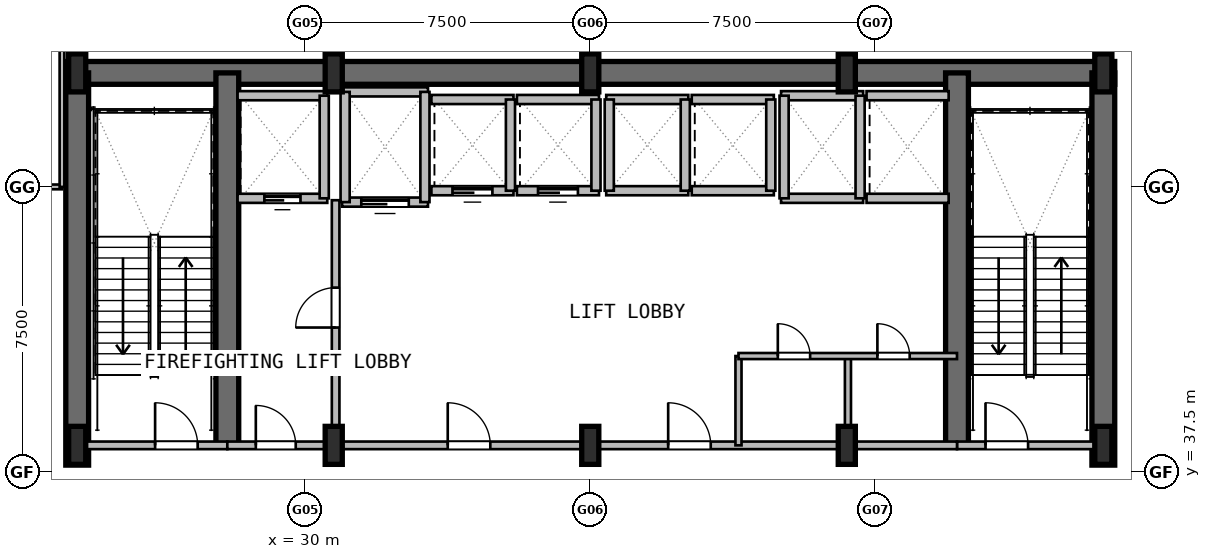
"""IFC4 building model, lengths in metres.
Left out: names, types, materials, properties, quantities, classifications, styles, units other than length and angle.
Written with IfcOpenShell. Run it as: python <this file> out.ifc"""

import sys

from ifc_helpers import new_model, si_unit, direction, frame, frame_2d, origin, origin_2d, place, context, subcontext, project, spatial, rectangle, i_section, extrude, element, fill, save


model = new_model("IFC4")
c1 = context("Model", 3, precision=1e-05, world=origin(), true_north=direction((0.0, 1.0)))
c2 = subcontext(c1, "Body", "Model", "MODEL_VIEW")
j1 = project(units=[si_unit("LENGTHUNIT", "METRE"), si_unit("PLANEANGLEUNIT", "RADIAN")], contexts=[c1])
p1 = place(None, origin())
s1 = spatial("IfcSite", under=j1, at=p1, CompositionType="ELEMENT")
p2 = place(p1, origin())
s2 = spatial("IfcBuilding", under=s1, at=p2, CompositionType="ELEMENT")
p3 = place(p2, frame((0.0, 0.0, 6.0)))
s3 = spatial("IfcBuildingStorey", under=s2, at=p3, CompositionType="ELEMENT", Elevation=6.0)
p4 = place(p3, frame((23.7, 48.0, 0.0), z_axis=(0.0, 0.0, 1.0), x_axis=(1.0, 0.0, 0.0)))
e1 = element("IfcWall", 1, at=p4, inside=s3, PredefinedType="SHEAR", context=c2, shape_type="SweptSolid", body=[
    extrude(rectangle(XDim=27.6, YDim=0.6, at=frame_2d((13.8, 0.0))), origin(), (0.0, 0.0, 1.0), 4.8),
])
for number, where, z_axis, x_axis in (
    (2, (24.0, 37.68, 0.0), (0.0, 0.0, 1.0), (0.0, 1.0, 0.0)),
    (3, (51.0, 37.68, 0.0), (0.0, 0.0, 1.0), (0.0, 1.0, 0.0)),
):
    element("IfcWall", number, at=place(p3, frame(where, z_axis=z_axis, x_axis=x_axis)), inside=s3, PredefinedType="SHEAR", context=c2, shape_type="SweptSolid", body=[
        extrude(rectangle(XDim=10.32, YDim=0.6, at=frame_2d((5.16, 0.0))), origin(), (0.0, 0.0, 1.0), 4.8),
    ])
for number, where, z_axis, x_axis in (
    (4, (27.95, 38.2, 0.0), (0.0, 0.0, 1.0), (0.0, 1.0, 0.0)),
    (5, (47.15, 38.2, 0.0), (0.0, 0.0, 1.0), (0.0, 1.0, 0.0)),
):
    element("IfcWall", number, at=place(p3, frame(where, z_axis=z_axis, x_axis=x_axis)), inside=s3, PredefinedType="SHEAR", context=c2, shape_type="SweptSolid", body=[
        extrude(rectangle(XDim=9.8, YDim=0.6, at=frame_2d((4.9, 0.0))), origin(), (0.0, 0.0, 1.0), 4.8),
    ])
for number, where, z_axis, x_axis in (
    (6, (24.0, 38.2, 0.0), (0.0, 0.0, 1.0), (1.0, 0.0, 0.0)),
    (7, (24.0, 48.0, 0.0), (0.0, 0.0, 1.0), (1.0, 0.0, 0.0)),
    (8, (30.75, 38.2, 0.0), (0.0, 0.0, 1.0), (1.0, 0.0, 0.0)),
    (9, (30.75, 48.0, 0.0), (0.0, 0.0, 1.0), (1.0, 0.0, 0.0)),
    (10, (37.5, 38.2, 0.0), (0.0, 0.0, 1.0), (1.0, 0.0, 0.0)),
    (11, (37.5, 48.0, 0.0), (0.0, 0.0, 1.0), (1.0, 0.0, 0.0)),
    (12, (44.25, 38.2, 0.0), (0.0, 0.0, 1.0), (1.0, 0.0, 0.0)),
    (13, (44.25, 48.0, 0.0), (0.0, 0.0, 1.0), (1.0, 0.0, 0.0)),
    (14, (51.0, 38.2, 0.0), (0.0, 0.0, 1.0), (1.0, 0.0, 0.0)),
    (15, (51.0, 48.0, 0.0), (0.0, 0.0, 1.0), (1.0, 0.0, 0.0)),
):
    element("IfcColumn", number, at=place(p3, frame(where, z_axis=z_axis, x_axis=x_axis)), inside=s3, PredefinedType="COLUMN", context=c2, shape_type="SweptSolid", body=[
        extrude(i_section(OverallWidth=0.45, OverallDepth=1.0, WebThickness=0.022, FlangeThickness=0.04, at=origin_2d()), origin(), (0.0, 0.0, 1.0), 4.8),
    ])
p5 = place(p3, frame((24.0, 38.2, 0.0), z_axis=(0.0, 0.0, 1.0), x_axis=(1.0, 0.0, 0.0)))
e16 = element("IfcWall", 16, at=p5, inside=s3, PredefinedType="PARTITIONING", context=c2, shape_type="SweptSolid", body=[
    extrude(rectangle(XDim=3.95, YDim=0.2, at=frame_2d((1.975, 0.0))), origin(), (0.0, 0.0, 1.0), 3.68),
])
p6 = place(p5, frame((2.05, 0.0, 0.0)))
e17 = element("IfcOpeningElement", 17, at=p6, cuts=e16, PredefinedType="OPENING", context=c2, shape_type="SweptSolid", body=[
    extrude(rectangle(XDim=1.12, YDim=2.1, at=frame_2d((0.56, 1.05))), frame((0.0, 0.11, 0.0), z_axis=(0.0, -1.0, 0.0), x_axis=(1.0, 0.0, 0.0)), (0.0, 0.0, 1.0), 0.22),
])
p7 = place(p3, frame((47.15, 38.2, 0.0), z_axis=(0.0, 0.0, 1.0), x_axis=(1.0, 0.0, 0.0)))
e18 = element("IfcWall", 18, at=p7, inside=s3, PredefinedType="PARTITIONING", context=c2, shape_type="SweptSolid", body=[
    extrude(rectangle(XDim=3.85, YDim=0.2, at=frame_2d((1.925, 0.0))), origin(), (0.0, 0.0, 1.0), 3.68),
])
p8 = place(p7, frame((0.75, 0.0, 0.0)))
e19 = element("IfcOpeningElement", 19, at=p8, cuts=e18, PredefinedType="OPENING", context=c2, shape_type="SweptSolid", body=[
    extrude(rectangle(XDim=1.12, YDim=2.1, at=frame_2d((0.56, 1.05))), frame((0.0, 0.11, 0.0), z_axis=(0.0, -1.0, 0.0), x_axis=(1.0, 0.0, 0.0)), (0.0, 0.0, 1.0), 0.22),
])
p9 = place(p3, frame((30.8, 38.2, 0.0), z_axis=(0.0, 0.0, 1.0), x_axis=(0.0, 1.0, 0.0)))
e20 = element("IfcWall", 20, at=p9, inside=s3, PredefinedType="PARTITIONING", context=c2, shape_type="SweptSolid", body=[
    extrude(rectangle(XDim=6.45, YDim=0.2, at=frame_2d((3.225, 0.0))), origin(), (0.0, 0.0, 1.0), 3.68),
])
p10 = place(p9, frame((3.1, 0.0, 0.0)))
e21 = element("IfcOpeningElement", 21, at=p10, cuts=e20, PredefinedType="OPENING", context=c2, shape_type="SweptSolid", body=[
    extrude(rectangle(XDim=1.05, YDim=2.1, at=frame_2d((0.525, 1.05))), frame((0.0, 0.11, 0.0), z_axis=(0.0, -1.0, 0.0), x_axis=(1.0, 0.0, 0.0)), (0.0, 0.0, 1.0), 0.22),
])
p11 = place(p3, frame((27.95, 38.2, 0.0), z_axis=(0.0, 0.0, 1.0), x_axis=(1.0, 0.0, 0.0)))
e22 = element("IfcWall", 22, at=p11, inside=s3, PredefinedType="PARTITIONING", context=c2, shape_type="SweptSolid", body=[
    extrude(rectangle(XDim=2.85, YDim=0.2, at=frame_2d((1.425, 0.0))), origin(), (0.0, 0.0, 1.0), 3.68),
])
p12 = place(p11, frame((0.75, 0.0, 0.0)))
e23 = element("IfcOpeningElement", 23, at=p12, cuts=e22, PredefinedType="OPENING", context=c2, shape_type="SweptSolid", body=[
    extrude(rectangle(XDim=1.05, YDim=2.1, at=frame_2d((0.525, 1.05))), frame((0.0, 0.11, 0.0), z_axis=(0.0, -1.0, 0.0), x_axis=(1.0, 0.0, 0.0)), (0.0, 0.0, 1.0), 0.22),
])
p13 = place(p3, frame((30.8, 38.2, 0.0), z_axis=(0.0, 0.0, 1.0), x_axis=(1.0, 0.0, 0.0)))
e24 = element("IfcWall", 24, at=p13, inside=s3, PredefinedType="PARTITIONING", context=c2, shape_type="SweptSolid", body=[
    extrude(rectangle(XDim=16.35, YDim=0.2, at=frame_2d((8.175, 0.0))), origin(), (0.0, 0.0, 1.0), 3.68),
])
p14 = place(p13, frame((2.95, 0.0, 0.0)))
e25 = element("IfcOpeningElement", 25, at=p14, cuts=e24, PredefinedType="OPENING", context=c2, shape_type="SweptSolid", body=[
    extrude(rectangle(XDim=1.12, YDim=2.1, at=frame_2d((0.56, 1.05))), frame((0.0, 0.11, 0.0), z_axis=(0.0, -1.0, 0.0), x_axis=(1.0, 0.0, 0.0)), (0.0, 0.0, 1.0), 0.22),
])
p15 = place(p13, frame((8.75, 0.0, 0.0)))
e26 = element("IfcOpeningElement", 26, at=p15, cuts=e24, PredefinedType="OPENING", context=c2, shape_type="SweptSolid", body=[
    extrude(rectangle(XDim=1.12, YDim=2.1, at=frame_2d((0.56, 1.05))), frame((0.0, 0.11, 0.0), z_axis=(0.0, -1.0, 0.0), x_axis=(1.0, 0.0, 0.0)), (0.0, 0.0, 1.0), 0.22),
])
p16 = place(p3, frame((28.22, 44.7, 0.0), z_axis=(0.0, 0.0, 1.0), x_axis=(1.0, 0.0, 0.0)))
e27 = element("IfcWall", 27, at=p16, inside=s3, PredefinedType="PARTITIONING", context=c2, shape_type="SweptSolid", body=[
    extrude(rectangle(XDim=2.36, YDim=0.24, at=frame_2d((1.18, 0.0))), origin(), (0.0, 0.0, 1.0), 4.48),
])
p17 = place(p16, frame((0.705, 0.0, 0.0)))
e28 = element("IfcOpeningElement", 28, at=p17, cuts=e27, PredefinedType="OPENING", context=c2, shape_type="SweptSolid", body=[
    extrude(rectangle(XDim=0.95, YDim=2.15, at=frame_2d((0.475, 1.075))), frame((0.0, 0.13, 0.0), z_axis=(0.0, -1.0, 0.0), x_axis=(1.0, 0.0, 0.0)), (0.0, 0.0, 1.0), 0.26),
])
p18 = place(p3, frame((28.22, 47.4, 0.0), z_axis=(0.0, 0.0, 1.0), x_axis=(1.0, 0.0, 0.0)))
e29 = element("IfcWall", 29, at=p18, inside=s3, PredefinedType="PARTITIONING", context=c2, shape_type="SweptSolid", body=[
    extrude(rectangle(XDim=2.36, YDim=0.24, at=frame_2d((1.18, 0.0))), origin(), (0.0, 0.0, 1.0), 4.48),
])
p19 = place(p3, frame((30.5, 44.7, 0.0), z_axis=(0.0, 0.0, 1.0), x_axis=(0.0, 1.0, 0.0)))
e30 = element("IfcWall", 30, at=p19, inside=s3, PredefinedType="PARTITIONING", context=c2, shape_type="SweptSolid", body=[
    extrude(rectangle(XDim=2.7, YDim=0.24, at=frame_2d((1.35, 0.0))), origin(), (0.0, 0.0, 1.0), 3.68),
])
p20 = place(p3, frame((30.97, 44.6, 0.0), z_axis=(0.0, 0.0, 1.0), x_axis=(1.0, 0.0, 0.0)))
e31 = element("IfcWall", 31, at=p20, inside=s3, PredefinedType="PARTITIONING", context=c2, shape_type="SweptSolid", body=[
    extrude(rectangle(XDim=2.26, YDim=0.24, at=frame_2d((1.13, 0.0))), origin(), (0.0, 0.0, 1.0), 4.48),
])
p21 = place(p20, frame((0.505, 0.0, 0.0)))
e32 = element("IfcOpeningElement", 32, at=p21, cuts=e31, PredefinedType="OPENING", context=c2, shape_type="SweptSolid", body=[
    extrude(rectangle(XDim=1.25, YDim=2.2, at=frame_2d((0.625, 1.1))), frame((0.0, 0.13, 0.0), z_axis=(0.0, -1.0, 0.0), x_axis=(1.0, 0.0, 0.0)), (0.0, 0.0, 1.0), 0.26),
])
p22 = place(p3, frame((30.97, 47.5, 0.0), z_axis=(0.0, 0.0, 1.0), x_axis=(1.0, 0.0, 0.0)))
e33 = element("IfcWall", 33, at=p22, inside=s3, PredefinedType="PARTITIONING", context=c2, shape_type="SweptSolid", body=[
    extrude(rectangle(XDim=2.26, YDim=0.24, at=frame_2d((1.13, 0.0))), origin(), (0.0, 0.0, 1.0), 4.48),
])
p23 = place(p3, frame((31.05, 44.6, 0.0), z_axis=(0.0, 0.0, 1.0), x_axis=(0.0, 1.0, 0.0)))
e34 = element("IfcWall", 34, at=p23, inside=s3, PredefinedType="PARTITIONING", context=c2, shape_type="SweptSolid", body=[
    extrude(rectangle(XDim=2.9, YDim=0.24, at=frame_2d((1.45, 0.0))), origin(), (0.0, 0.0, 1.0), 3.68),
])
p24 = place(p3, frame((33.15, 44.6, 0.0), z_axis=(0.0, 0.0, 1.0), x_axis=(0.0, 1.0, 0.0)))
e35 = element("IfcWall", 35, at=p24, inside=s3, PredefinedType="PARTITIONING", context=c2, shape_type="SweptSolid", body=[
    extrude(rectangle(XDim=2.9, YDim=0.24, at=frame_2d((1.45, 0.0))), origin(), (0.0, 0.0, 1.0), 4.48),
])
p25 = place(p3, frame((33.32, 44.9, 0.0), z_axis=(0.0, 0.0, 1.0), x_axis=(1.0, 0.0, 0.0)))
e36 = element("IfcWall", 36, at=p25, inside=s3, PredefinedType="PARTITIONING", context=c2, shape_type="SweptSolid", body=[
    extrude(rectangle(XDim=2.16, YDim=0.24, at=frame_2d((1.08, 0.0))), origin(), (0.0, 0.0, 1.0), 4.48),
])
p26 = place(p25, frame((0.555, 0.0, 0.0)))
e37 = element("IfcOpeningElement", 37, at=p26, cuts=e36, PredefinedType="OPENING", context=c2, shape_type="SweptSolid", body=[
    extrude(rectangle(XDim=1.05, YDim=2.15, at=frame_2d((0.525, 1.075))), frame((0.0, 0.13, 0.0), z_axis=(0.0, -1.0, 0.0), x_axis=(1.0, 0.0, 0.0)), (0.0, 0.0, 1.0), 0.26),
])
p27 = place(p3, frame((33.32, 47.3, 0.0), z_axis=(0.0, 0.0, 1.0), x_axis=(1.0, 0.0, 0.0)))
e38 = element("IfcWall", 38, at=p27, inside=s3, PredefinedType="PARTITIONING", context=c2, shape_type="SweptSolid", body=[
    extrude(rectangle(XDim=2.16, YDim=0.24, at=frame_2d((1.08, 0.0))), origin(), (0.0, 0.0, 1.0), 4.48),
])
p28 = place(p3, frame((35.4, 44.9, 0.0), z_axis=(0.0, 0.0, 1.0), x_axis=(0.0, 1.0, 0.0)))
e39 = element("IfcWall", 39, at=p28, inside=s3, PredefinedType="PARTITIONING", context=c2, shape_type="SweptSolid", body=[
    extrude(rectangle(XDim=2.4, YDim=0.24, at=frame_2d((1.2, 0.0))), origin(), (0.0, 0.0, 1.0), 4.48),
])
p29 = place(p3, frame((35.57, 44.9, 0.0), z_axis=(0.0, 0.0, 1.0), x_axis=(1.0, 0.0, 0.0)))
e40 = element("IfcWall", 40, at=p29, inside=s3, PredefinedType="PARTITIONING", context=c2, shape_type="SweptSolid", body=[
    extrude(rectangle(XDim=2.16, YDim=0.24, at=frame_2d((1.08, 0.0))), origin(), (0.0, 0.0, 1.0), 4.48),
])
p30 = place(p29, frame((0.555, 0.0, 0.0)))
e41 = element("IfcOpeningElement", 41, at=p30, cuts=e40, PredefinedType="OPENING", context=c2, shape_type="SweptSolid", body=[
    extrude(rectangle(XDim=1.05, YDim=2.15, at=frame_2d((0.525, 1.075))), frame((0.0, 0.13, 0.0), z_axis=(0.0, -1.0, 0.0), x_axis=(1.0, 0.0, 0.0)), (0.0, 0.0, 1.0), 0.26),
])
p31 = place(p3, frame((35.57, 47.3, 0.0), z_axis=(0.0, 0.0, 1.0), x_axis=(1.0, 0.0, 0.0)))
e42 = element("IfcWall", 42, at=p31, inside=s3, PredefinedType="PARTITIONING", context=c2, shape_type="SweptSolid", body=[
    extrude(rectangle(XDim=2.16, YDim=0.24, at=frame_2d((1.08, 0.0))), origin(), (0.0, 0.0, 1.0), 4.48),
])
p32 = place(p3, frame((37.65, 44.9, 0.0), z_axis=(0.0, 0.0, 1.0), x_axis=(0.0, 1.0, 0.0)))
e43 = element("IfcWall", 43, at=p32, inside=s3, PredefinedType="PARTITIONING", context=c2, shape_type="SweptSolid", body=[
    extrude(rectangle(XDim=2.4, YDim=0.24, at=frame_2d((1.2, 0.0))), origin(), (0.0, 0.0, 1.0), 4.48),
])
for number, where, z_axis, x_axis in (
    (44, (37.92, 44.9, 0.0), (0.0, 0.0, 1.0), (1.0, 0.0, 0.0)),
    (45, (37.92, 47.3, 0.0), (0.0, 0.0, 1.0), (1.0, 0.0, 0.0)),
):
    element("IfcWall", number, at=place(p3, frame(where, z_axis=z_axis, x_axis=x_axis)), inside=s3, PredefinedType="PARTITIONING", context=c2, shape_type="SweptSolid", body=[
        extrude(rectangle(XDim=2.16, YDim=0.24, at=frame_2d((1.08, 0.0))), origin(), (0.0, 0.0, 1.0), 4.48),
    ])
for number, where, z_axis, x_axis in (
    (46, (38.0, 44.9, 0.0), (0.0, 0.0, 1.0), (0.0, 1.0, 0.0)),
    (47, (40.0, 44.9, 0.0), (0.0, 0.0, 1.0), (0.0, 1.0, 0.0)),
):
    element("IfcWall", number, at=place(p3, frame(where, z_axis=z_axis, x_axis=x_axis)), inside=s3, PredefinedType="PARTITIONING", context=c2, shape_type="SweptSolid", body=[
        extrude(rectangle(XDim=2.4, YDim=0.24, at=frame_2d((1.2, 0.0))), origin(), (0.0, 0.0, 1.0), 4.48),
    ])
for number, where, z_axis, x_axis in (
    (48, (40.17, 44.9, 0.0), (0.0, 0.0, 1.0), (1.0, 0.0, 0.0)),
    (49, (40.17, 47.3, 0.0), (0.0, 0.0, 1.0), (1.0, 0.0, 0.0)),
):
    element("IfcWall", number, at=place(p3, frame(where, z_axis=z_axis, x_axis=x_axis)), inside=s3, PredefinedType="PARTITIONING", context=c2, shape_type="SweptSolid", body=[
        extrude(rectangle(XDim=2.16, YDim=0.24, at=frame_2d((1.08, 0.0))), origin(), (0.0, 0.0, 1.0), 4.48),
    ])
p33 = place(p3, frame((42.25, 44.9, 0.0), z_axis=(0.0, 0.0, 1.0), x_axis=(0.0, 1.0, 0.0)))
e50 = element("IfcWall", 50, at=p33, inside=s3, PredefinedType="PARTITIONING", context=c2, shape_type="SweptSolid", body=[
    extrude(rectangle(XDim=2.4, YDim=0.24, at=frame_2d((1.2, 0.0))), origin(), (0.0, 0.0, 1.0), 4.48),
])
for number, where, z_axis, x_axis in (
    (51, (42.52, 44.7, 0.0), (0.0, 0.0, 1.0), (1.0, 0.0, 0.0)),
    (52, (42.52, 47.4, 0.0), (0.0, 0.0, 1.0), (1.0, 0.0, 0.0)),
):
    element("IfcWall", number, at=place(p3, frame(where, z_axis=z_axis, x_axis=x_axis)), inside=s3, PredefinedType="PARTITIONING", context=c2, shape_type="SweptSolid", body=[
        extrude(rectangle(XDim=2.16, YDim=0.24, at=frame_2d((1.08, 0.0))), origin(), (0.0, 0.0, 1.0), 4.48),
    ])
for number, where, z_axis, x_axis in (
    (53, (42.6, 44.7, 0.0), (0.0, 0.0, 1.0), (0.0, 1.0, 0.0)),
    (54, (44.6, 44.7, 0.0), (0.0, 0.0, 1.0), (0.0, 1.0, 0.0)),
):
    element("IfcWall", number, at=place(p3, frame(where, z_axis=z_axis, x_axis=x_axis)), inside=s3, PredefinedType="PARTITIONING", context=c2, shape_type="SweptSolid", body=[
        extrude(rectangle(XDim=2.7, YDim=0.24, at=frame_2d((1.35, 0.0))), origin(), (0.0, 0.0, 1.0), 4.48),
    ])
for number, where, z_axis, x_axis in (
    (55, (44.77, 44.7, 0.0), (0.0, 0.0, 1.0), (1.0, 0.0, 0.0)),
    (56, (44.77, 47.4, 0.0), (0.0, 0.0, 1.0), (1.0, 0.0, 0.0)),
):
    element("IfcWall", number, at=place(p3, frame(where, z_axis=z_axis, x_axis=x_axis)), inside=s3, PredefinedType="PARTITIONING", context=c2, shape_type="SweptSolid", body=[
        extrude(rectangle(XDim=2.16, YDim=0.24, at=frame_2d((1.08, 0.0))), origin(), (0.0, 0.0, 1.0), 4.48),
    ])
p34 = place(p3, frame((19.0, 45.0, 0.0), z_axis=(0.0, 0.0, 1.0), x_axis=(1.0, 0.0, 0.0)))
e57 = element("IfcWall", 57, at=p34, inside=s3, PredefinedType="PARTITIONING", context=c2, shape_type="SweptSolid", body=[
    extrude(rectangle(XDim=4.6, YDim=0.125, at=frame_2d((2.3, 0.0))), origin(), (0.0, 0.0, 1.0), 4.48),
])
p35 = place(p34, frame((1.5, 0.0, 0.0)))
e58 = element("IfcOpeningElement", 58, at=p35, cuts=e57, PredefinedType="OPENING", context=c2, shape_type="SweptSolid", body=[
    extrude(rectangle(XDim=0.9, YDim=2.05, at=frame_2d((0.45, 1.025))), frame((0.0, 0.073, 0.0), z_axis=(0.0, -1.0, 0.0), x_axis=(1.0, 0.0, 0.0)), (0.0, 0.0, 1.0), 0.145),
])
p36 = place(p3, frame((23.6, 45.0, 0.0), z_axis=(0.0, 0.0, 1.0), x_axis=(0.0, 1.0, 0.0)))
e59 = element("IfcWall", 59, at=p36, inside=s3, PredefinedType="PARTITIONING", context=c2, shape_type="SweptSolid", body=[
    extrude(rectangle(XDim=4.6, YDim=0.125, at=frame_2d((2.3, 0.0))), origin(), (0.0, 0.0, 1.0), 4.48),
])
for number, where, z_axis, x_axis in (
    (60, (41.4, 38.2, 0.0), (0.0, 0.0, 1.0), (0.0, 1.0, 0.0)),
    (61, (44.28, 38.2, 0.0), (0.0, 0.0, 1.0), (0.0, 1.0, 0.0)),
):
    element("IfcWall", number, at=place(p3, frame(where, z_axis=z_axis, x_axis=x_axis)), inside=s3, PredefinedType="PARTITIONING", context=c2, shape_type="SweptSolid", body=[
        extrude(rectangle(XDim=2.35, YDim=0.16, at=frame_2d((1.175, 0.0))), origin(), (0.0, 0.0, 1.0), 4.48),
    ])
p37 = place(p3, frame((41.4, 40.55, 0.0), z_axis=(0.0, 0.0, 1.0), x_axis=(1.0, 0.0, 0.0)))
e62 = element("IfcWall", 62, at=p37, inside=s3, PredefinedType="PARTITIONING", context=c2, shape_type="SweptSolid", body=[
    extrude(rectangle(XDim=5.75, YDim=0.16, at=frame_2d((2.875, 0.0))), origin(), (0.0, 0.0, 1.0), 4.48),
])
p38 = place(p37, frame((1.035, 0.0, 0.0)))
e63 = element("IfcOpeningElement", 63, at=p38, cuts=e62, PredefinedType="OPENING", context=c2, shape_type="SweptSolid", body=[
    extrude(rectangle(XDim=0.85, YDim=2.05, at=frame_2d((0.425, 1.025))), frame((0.0, 0.09, 0.0), z_axis=(0.0, -1.0, 0.0), x_axis=(1.0, 0.0, 0.0)), (0.0, 0.0, 1.0), 0.18),
])
p39 = place(p37, frame((3.655, 0.0, 0.0)))
e64 = element("IfcOpeningElement", 64, at=p39, cuts=e62, PredefinedType="OPENING", context=c2, shape_type="SweptSolid", body=[
    extrude(rectangle(XDim=0.85, YDim=2.05, at=frame_2d((0.425, 1.025))), frame((0.0, 0.09, 0.0), z_axis=(0.0, -1.0, 0.0), x_axis=(1.0, 0.0, 0.0)), (0.0, 0.0, 1.0), 0.18),
])
p40 = place(p6, origin())
e65 = element("IfcDoor", 65, at=p40, inside=s3, OperationType="SINGLE_SWING_LEFT", PredefinedType="DOOR", context=c2, shape_type="SweptSolid", body=[
    extrude(rectangle(XDim=1.12, YDim=2.1, at=frame_2d((0.56, 1.05))), frame((0.0, 0.025, 0.0), z_axis=(0.0, -1.0, 0.0), x_axis=(1.0, 0.0, 0.0)), (0.0, 0.0, 1.0), 0.05),
])
fill(e17, e65)
p41 = place(p8, origin())
e66 = element("IfcDoor", 66, at=p41, inside=s3, OperationType="SINGLE_SWING_RIGHT", PredefinedType="DOOR", context=c2, shape_type="SweptSolid", body=[
    extrude(rectangle(XDim=1.12, YDim=2.1, at=frame_2d((0.56, 1.05))), frame((0.0, 0.025, 0.0), z_axis=(0.0, -1.0, 0.0), x_axis=(1.0, 0.0, 0.0)), (0.0, 0.0, 1.0), 0.05),
])
fill(e19, e66)
p42 = place(p10, origin())
e67 = element("IfcDoor", 67, at=p42, inside=s3, OperationType="SINGLE_SWING_LEFT", PredefinedType="DOOR", context=c2, shape_type="SweptSolid", body=[
    extrude(rectangle(XDim=1.05, YDim=2.1, at=frame_2d((0.525, 1.05))), frame((0.0, 0.025, 0.0), z_axis=(0.0, -1.0, 0.0), x_axis=(1.0, 0.0, 0.0)), (0.0, 0.0, 1.0), 0.05),
])
fill(e21, e67)
p43 = place(p12, origin())
e68 = element("IfcDoor", 68, at=p43, inside=s3, OperationType="SINGLE_SWING_RIGHT", PredefinedType="DOOR", context=c2, shape_type="SweptSolid", body=[
    extrude(rectangle(XDim=1.05, YDim=2.1, at=frame_2d((0.525, 1.05))), frame((0.0, 0.025, 0.0), z_axis=(0.0, -1.0, 0.0), x_axis=(1.0, 0.0, 0.0)), (0.0, 0.0, 1.0), 0.05),
])
fill(e23, e68)
p44 = place(p14, origin())
e69 = element("IfcDoor", 69, at=p44, inside=s3, OperationType="SINGLE_SWING_LEFT", PredefinedType="DOOR", context=c2, shape_type="SweptSolid", body=[
    extrude(rectangle(XDim=1.12, YDim=2.1, at=frame_2d((0.56, 1.05))), frame((0.0, 0.025, 0.0), z_axis=(0.0, -1.0, 0.0), x_axis=(1.0, 0.0, 0.0)), (0.0, 0.0, 1.0), 0.05),
])
fill(e25, e69)
p45 = place(p15, origin())
e70 = element("IfcDoor", 70, at=p45, inside=s3, OperationType="SINGLE_SWING_RIGHT", PredefinedType="DOOR", context=c2, shape_type="SweptSolid", body=[
    extrude(rectangle(XDim=1.12, YDim=2.1, at=frame_2d((0.56, 1.05))), frame((0.0, 0.025, 0.0), z_axis=(0.0, -1.0, 0.0), x_axis=(1.0, 0.0, 0.0)), (0.0, 0.0, 1.0), 0.05),
])
fill(e26, e70)
p46 = place(p17, origin())
e71 = element("IfcDoor", 71, at=p46, inside=s3, OperationType="SLIDING_TO_LEFT", PredefinedType="DOOR", context=c2, shape_type="SweptSolid", body=[
    extrude(rectangle(XDim=0.95, YDim=2.15, at=frame_2d((0.475, 1.075))), frame((0.0, 0.025, 0.0), z_axis=(0.0, -1.0, 0.0), x_axis=(1.0, 0.0, 0.0)), (0.0, 0.0, 1.0), 0.05),
])
fill(e28, e71)
p47 = place(p21, origin())
e72 = element("IfcDoor", 72, at=p47, inside=s3, OperationType="SLIDING_TO_LEFT", PredefinedType="DOOR", context=c2, shape_type="SweptSolid", body=[
    extrude(rectangle(XDim=1.25, YDim=2.2, at=frame_2d((0.625, 1.1))), frame((0.0, 0.025, 0.0), z_axis=(0.0, -1.0, 0.0), x_axis=(1.0, 0.0, 0.0)), (0.0, 0.0, 1.0), 0.05),
])
fill(e32, e72)
p48 = place(p26, origin())
e73 = element("IfcDoor", 73, at=p48, inside=s3, OperationType="SLIDING_TO_LEFT", PredefinedType="DOOR", context=c2, shape_type="SweptSolid", body=[
    extrude(rectangle(XDim=1.05, YDim=2.15, at=frame_2d((0.525, 1.075))), frame((0.0, 0.025, 0.0), z_axis=(0.0, -1.0, 0.0), x_axis=(1.0, 0.0, 0.0)), (0.0, 0.0, 1.0), 0.05),
])
fill(e37, e73)
p49 = place(p30, origin())
e74 = element("IfcDoor", 74, at=p49, inside=s3, OperationType="SLIDING_TO_LEFT", PredefinedType="DOOR", context=c2, shape_type="SweptSolid", body=[
    extrude(rectangle(XDim=1.05, YDim=2.15, at=frame_2d((0.525, 1.075))), frame((0.0, 0.025, 0.0), z_axis=(0.0, -1.0, 0.0), x_axis=(1.0, 0.0, 0.0)), (0.0, 0.0, 1.0), 0.05),
])
fill(e41, e74)
p50 = place(p38, origin())
e75 = element("IfcDoor", 75, at=p50, inside=s3, OperationType="SINGLE_SWING_RIGHT", PredefinedType="DOOR", context=c2, shape_type="SweptSolid", body=[
    extrude(rectangle(XDim=0.85, YDim=2.05, at=frame_2d((0.425, 1.025))), frame((0.0, 0.025, 0.0), z_axis=(0.0, -1.0, 0.0), x_axis=(1.0, 0.0, 0.0)), (0.0, 0.0, 1.0), 0.05),
])
fill(e63, e75)
p51 = place(p39, origin())
e76 = element("IfcDoor", 76, at=p51, inside=s3, OperationType="SINGLE_SWING_LEFT", PredefinedType="DOOR", context=c2, shape_type="SweptSolid", body=[
    extrude(rectangle(XDim=0.85, YDim=2.05, at=frame_2d((0.425, 1.025))), frame((0.0, 0.025, 0.0), z_axis=(0.0, -1.0, 0.0), x_axis=(1.0, 0.0, 0.0)), (0.0, 0.0, 1.0), 0.05),
])
fill(e64, e76)
save(model, sys.argv[1])
